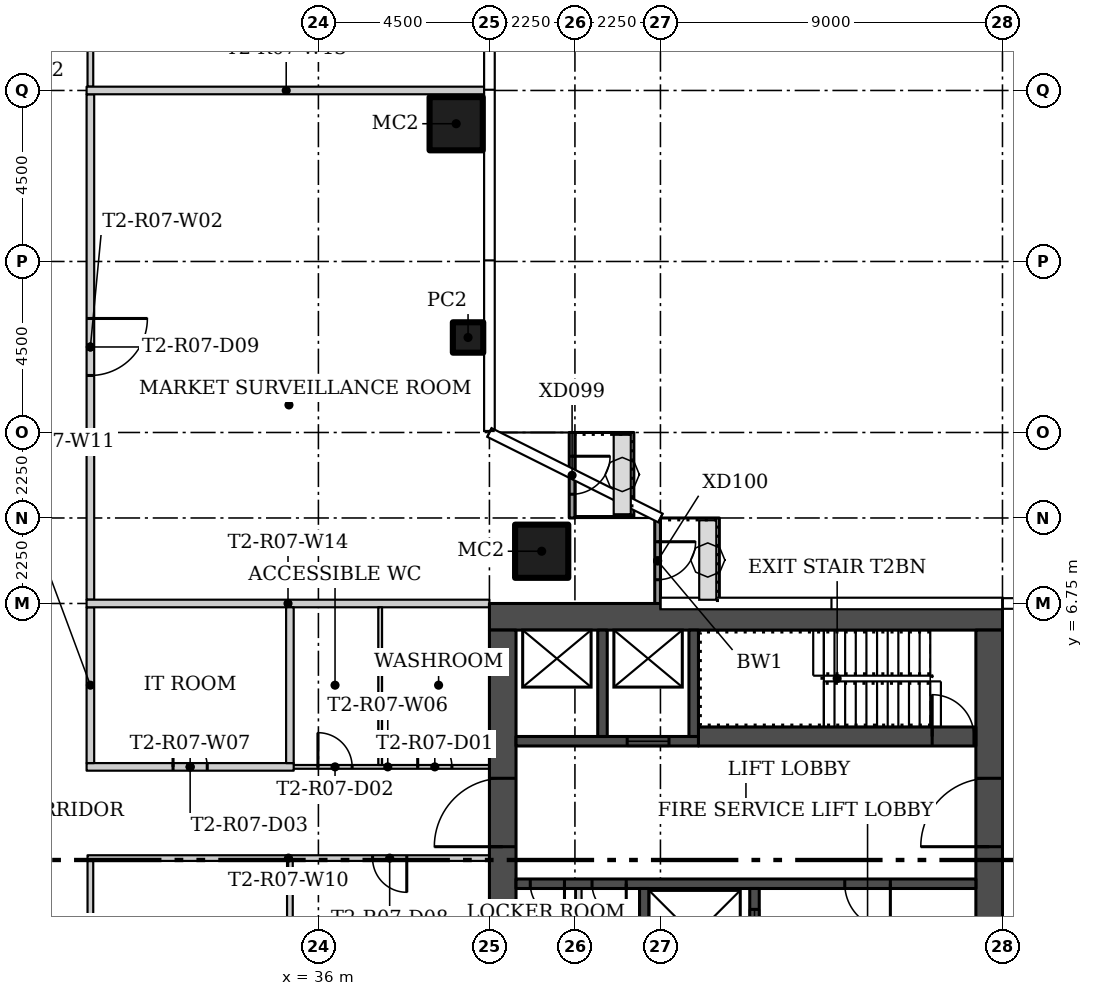
"""IFC4 building model, lengths in metres.
Left out: names, types, materials, properties, quantities, classifications, styles, units other than length and angle.
Written with IfcOpenShell. Run it as: python <this file> out.ifc"""

import sys

from ifc_helpers import new_model, si_unit, direction, frame, frame_2d, origin, origin_2d, place, context, subcontext, project, spatial, rectangle, hollow_rectangle, extrude, element, fill, save


model = new_model("IFC4")
c1 = context("Model", 3, precision=1e-05, world=origin(), true_north=direction((0.0, 1.0)))
c2 = subcontext(c1, "Body", "Model", "MODEL_VIEW")
j1 = project(units=[si_unit("LENGTHUNIT", "METRE"), si_unit("PLANEANGLEUNIT", "RADIAN")], contexts=[c1])
p1 = place(None, origin())
s1 = spatial("IfcSite", under=j1, at=p1, CompositionType="ELEMENT")
p2 = place(p1, origin())
s2 = spatial("IfcBuilding", under=s1, at=p2, CompositionType="ELEMENT")
p3 = place(p2, frame((0.0, 0.0, 73.2)))
s3 = spatial("IfcBuildingStorey", under=s2, at=p3, CompositionType="ELEMENT", Elevation=73.2)
p4 = place(p3, frame((41.875, 8.125, 0.0)))
e1 = element("IfcColumn", 1, at=p4, inside=s3, PredefinedType="COLUMN", context=c2, shape_type="SweptSolid", body=[
    extrude(hollow_rectangle(XDim=1.4, YDim=1.4, WallThickness=0.05, at=origin_2d()), origin(), (0.0, 0.0, 1.0), 3.45),
])
p5 = place(p3, frame((39.938, 13.75, 0.0)))
e2 = element("IfcColumn", 2, at=p5, inside=s3, PredefinedType="COLUMN", context=c2, shape_type="SweptSolid", body=[
    extrude(hollow_rectangle(XDim=0.8, YDim=0.8, WallThickness=0.025, at=origin_2d()), origin(), (0.0, 0.0, 1.0), 3.45),
])
p6 = place(p3, frame((39.625, 19.375, 0.0)))
e3 = element("IfcColumn", 3, at=p6, inside=s3, PredefinedType="COLUMN", context=c2, shape_type="SweptSolid", body=[
    extrude(hollow_rectangle(XDim=1.4, YDim=1.4, WallThickness=0.05, at=origin_2d()), origin(), (0.0, 0.0, 1.0), 3.45),
])
p7 = place(p3, frame((30.0, 20.15, 0.0), z_axis=(0.0, 0.0, 1.0), x_axis=(0.0, -1.0, 0.0)))
e4 = element("IfcWall", 4, at=p7, inside=s3, PredefinedType="PARTITIONING", context=c2, shape_type="SweptSolid", body=[
    extrude(rectangle(XDim=13.3, YDim=0.2, at=frame_2d((6.65, 0.0))), origin(), (0.0, 0.0, 1.0), 3.45),
])
p8 = place(p7, frame((5.9, 0.0, 0.0)))
e5 = element("IfcOpeningElement", 5, at=p8, cuts=e4, PredefinedType="OPENING", context=c2, shape_type="SweptSolid", body=[
    extrude(rectangle(XDim=1.5, YDim=2.1, at=frame_2d((0.75, 1.05))), frame((0.0, 0.11, 0.0), z_axis=(0.0, -1.0, 0.0), x_axis=(1.0, 0.0, 0.0)), (0.0, 0.0, 1.0), 0.22),
])
p9 = place(p3, frame((30.0, -0.025, 0.0), z_axis=(0.0, 0.0, 1.0), x_axis=(0.0, -1.0, 0.0)))
e6 = element("IfcWall", 6, at=p9, inside=s3, PredefinedType="PARTITIONING", context=c2, shape_type="SweptSolid", body=[
    extrude(rectangle(XDim=6.65, YDim=0.15, at=frame_2d((3.325, 0.0))), origin(), (0.0, 0.0, 1.0), 3.45),
])
p10 = place(p9, frame((2.875, 0.0, 0.0)))
e7 = element("IfcOpeningElement", 7, at=p10, cuts=e6, PredefinedType="OPENING", context=c2, shape_type="SweptSolid", body=[
    extrude(rectangle(XDim=0.9, YDim=2.1, at=frame_2d((0.45, 1.05))), frame((0.0, 0.085, 0.0), z_axis=(0.0, -1.0, 0.0), x_axis=(1.0, 0.0, 0.0)), (0.0, 0.0, 1.0), 0.17),
])
p11 = place(p3, frame((30.0, 29.155, 0.0), z_axis=(0.0, 0.0, 1.0), x_axis=(0.0, -1.0, 0.0)))
e8 = element("IfcWall", 8, at=p11, inside=s3, PredefinedType="PARTITIONING", context=c2, shape_type="SweptSolid", body=[
    extrude(rectangle(XDim=8.805, YDim=0.15, at=frame_2d((4.402, 0.0))), origin(), (0.0, 0.0, 1.0), 3.45),
])
p12 = place(p11, frame((3.905, 0.0, 0.0)))
e9 = element("IfcOpeningElement", 9, at=p12, cuts=e8, PredefinedType="OPENING", context=c2, shape_type="SweptSolid", body=[
    extrude(rectangle(XDim=1.0, YDim=2.4, at=frame_2d((0.5, 1.2))), frame((0.0, 0.085, 0.0), z_axis=(0.0, -1.0, 0.0), x_axis=(1.0, 0.0, 0.0)), (0.0, 0.0, 1.0), 0.17),
])
p13 = place(p3, frame((35.15, 2.45, 0.0)))
e10 = element("IfcWall", 10, at=p13, inside=s3, PredefinedType="PARTITIONING", context=c2, shape_type="SweptSolid", body=[
    extrude(rectangle(XDim=5.35, YDim=0.1, at=frame_2d((2.675, 0.0))), origin(), (0.0, 0.0, 1.0), 3.45),
])
p14 = place(p13, frame((3.462, 0.0, 0.0)))
e11 = element("IfcOpeningElement", 11, at=p14, cuts=e10, PredefinedType="OPENING", context=c2, shape_type="SweptSolid", body=[
    extrude(rectangle(XDim=0.9, YDim=2.1, at=frame_2d((0.45, 1.05))), frame((0.0, 0.06, 0.0), z_axis=(0.0, -1.0, 0.0), x_axis=(1.0, 0.0, 0.0)), (0.0, 0.0, 1.0), 0.12),
])
p15 = place(p13, frame((0.837, 0.0, 0.0)))
e12 = element("IfcOpeningElement", 12, at=p15, cuts=e10, PredefinedType="OPENING", context=c2, shape_type="SweptSolid", body=[
    extrude(rectangle(XDim=0.9, YDim=2.1, at=frame_2d((0.45, 1.05))), frame((0.0, 0.06, 0.0), z_axis=(0.0, -1.0, 0.0), x_axis=(1.0, 0.0, 0.0)), (0.0, 0.0, 1.0), 0.12),
])
p16 = place(p3, frame((29.9, 2.45, 0.0)))
e13 = element("IfcWall", 13, at=p16, inside=s3, PredefinedType="PARTITIONING", context=c2, shape_type="SweptSolid", body=[
    extrude(rectangle(XDim=5.45, YDim=0.2, at=frame_2d((2.725, 0.0))), origin(), (0.0, 0.0, 1.0), 3.45),
])
p17 = place(p16, frame((2.275, 0.0, 0.0)))
e14 = element("IfcOpeningElement", 14, at=p17, cuts=e13, PredefinedType="OPENING", context=c2, shape_type="SweptSolid", body=[
    extrude(rectangle(XDim=0.9, YDim=2.1, at=frame_2d((0.45, 1.05))), frame((0.0, 0.11, 0.0), z_axis=(0.0, -1.0, 0.0), x_axis=(1.0, 0.0, 0.0)), (0.0, 0.0, 1.0), 0.22),
])
p18 = place(p3, frame((30.0, 6.65, 0.0), z_axis=(0.0, 0.0, 1.0), x_axis=(0.0, -1.0, 0.0)))
e15 = element("IfcWall", 15, at=p18, inside=s3, PredefinedType="PARTITIONING", context=c2, shape_type="SweptSolid", body=[
    extrude(rectangle(XDim=4.1, YDim=0.2, at=frame_2d((2.05, 0.0))), origin(), (0.0, 0.0, 1.0), 3.45),
])
p19 = place(p3, frame((40.5, 0.05, 0.0), z_axis=(0.0, 0.0, 1.0), x_axis=(-1.0, 0.0, 0.0)))
e16 = element("IfcWall", 16, at=p19, inside=s3, PredefinedType="PARTITIONING", context=c2, shape_type="SweptSolid", body=[
    extrude(rectangle(XDim=10.575, YDim=0.15, at=frame_2d((5.288, 0.0))), origin(), (0.0, 0.0, 1.0), 3.45),
])
p20 = place(p19, frame((2.175, 0.0, 0.0)))
e17 = element("IfcOpeningElement", 17, at=p20, cuts=e16, PredefinedType="OPENING", context=c2, shape_type="SweptSolid", body=[
    extrude(rectangle(XDim=0.9, YDim=2.1, at=frame_2d((0.45, 1.05))), frame((0.0, 0.085, 0.0), z_axis=(0.0, -1.0, 0.0), x_axis=(1.0, 0.0, 0.0)), (0.0, 0.0, 1.0), 0.17),
])
p21 = place(p3, frame((40.405, 20.25, 0.0), z_axis=(0.0, 0.0, 1.0), x_axis=(-1.0, 0.0, 0.0)))
e18 = element("IfcWall", 18, at=p21, inside=s3, PredefinedType="PARTITIONING", context=c2, shape_type="SweptSolid", body=[
    extrude(rectangle(XDim=10.505, YDim=0.2, at=frame_2d((5.252, 0.0))), origin(), (0.0, 0.0, 1.0), 3.45),
])
p22 = place(p3, frame((29.9, 6.75, 0.0)))
e19 = element("IfcWall", 19, at=p22, inside=s3, PredefinedType="PARTITIONING", context=c2, shape_type="SweptSolid", body=[
    extrude(rectangle(XDim=10.6, YDim=0.2, at=frame_2d((5.3, 0.0))), origin(), (0.0, 0.0, 1.0), 3.45),
])
p23 = place(p3, frame((37.625, 6.65, 0.0), z_axis=(0.0, 0.0, 1.0), x_axis=(0.0, -1.0, 0.0)))
e20 = element("IfcWall", 20, at=p23, inside=s3, PredefinedType="PARTITIONING", context=c2, shape_type="SweptSolid", body=[
    extrude(rectangle(XDim=4.15, YDim=0.1, at=frame_2d((2.075, 0.0))), origin(), (0.0, 0.0, 1.0), 3.45),
])
p24 = place(p3, frame((35.25, 6.65, 0.0), z_axis=(0.0, 0.0, 1.0), x_axis=(0.0, -1.0, 0.0)))
e21 = element("IfcWall", 21, at=p24, inside=s3, PredefinedType="PARTITIONING", context=c2, shape_type="SweptSolid", body=[
    extrude(rectangle(XDim=4.1, YDim=0.2, at=frame_2d((2.05, 0.0))), origin(), (0.0, 0.0, 1.0), 3.45),
])
p25 = place(p3, frame((35.25, -0.025, 0.0), z_axis=(0.0, 0.0, 1.0), x_axis=(0.0, -1.0, 0.0)))
e22 = element("IfcWall", 22, at=p25, inside=s3, PredefinedType="PARTITIONING", context=c2, shape_type="SweptSolid", body=[
    extrude(rectangle(XDim=6.65, YDim=0.15, at=frame_2d((3.325, 0.0))), origin(), (0.0, 0.0, 1.0), 3.45),
])
p26 = place(p3, frame((42.675, 11.25, 0.0), z_axis=(0.0, 0.0, 1.0), x_axis=(0.0, -1.0, 0.0)))
e23 = element("IfcWall", 23, at=p26, inside=s3, PredefinedType="SOLIDWALL", context=c2, shape_type="SweptSolid", body=[
    extrude(rectangle(XDim=2.25, YDim=0.15, at=frame_2d((1.125, 0.0))), origin(), (0.0, 0.0, 1.0), 3.45),
])
p27 = place(p26, frame((0.625, 0.0, 0.0)))
e24 = element("IfcOpeningElement", 24, at=p27, cuts=e23, PredefinedType="OPENING", context=c2, shape_type="SweptSolid", body=[
    extrude(rectangle(XDim=1.0, YDim=2.4, at=frame_2d((0.5, 1.2))), frame((0.0, 0.085, 0.0), z_axis=(0.0, -1.0, 0.0), x_axis=(1.0, 0.0, 0.0)), (0.0, 0.0, 1.0), 0.17),
])
p28 = place(p3, frame((44.925, 9.0, 0.0), z_axis=(0.0, 0.0, 1.0), x_axis=(0.0, -1.0, 0.0)))
e25 = element("IfcWall", 25, at=p28, inside=s3, PredefinedType="SOLIDWALL", context=c2, shape_type="SweptSolid", body=[
    extrude(rectangle(XDim=2.257, YDim=0.15, at=frame_2d((1.128, 0.0))), origin(), (0.0, 0.0, 1.0), 3.45),
])
p29 = place(p28, frame((0.625, 0.0, 0.0)))
e26 = element("IfcOpeningElement", 26, at=p29, cuts=e25, PredefinedType="OPENING", context=c2, shape_type="SweptSolid", body=[
    extrude(rectangle(XDim=1.0, YDim=2.4, at=frame_2d((0.5, 1.2))), frame((0.0, 0.085, 0.0), z_axis=(0.0, -1.0, 0.0), x_axis=(1.0, 0.0, 0.0)), (0.0, 0.0, 1.0), 0.17),
])
p30 = place(p3, frame((54.0, 6.4, 0.0), z_axis=(0.0, 0.0, 1.0), x_axis=(-1.0, 0.0, 0.0)))
e27 = element("IfcWall", 27, at=p30, inside=s3, PredefinedType="SHEAR", context=c2, shape_type="SweptSolid", body=[
    extrude(rectangle(XDim=13.5, YDim=0.7, at=frame_2d((6.75, 0.0))), origin(), (0.0, 0.0, 1.0), 3.45),
])
p31 = place(p3, frame((53.65, -6.05, 0.0), z_axis=(0.0, 0.0, 1.0), x_axis=(0.0, 1.0, 0.0)))
e28 = element("IfcWall", 28, at=p31, inside=s3, PredefinedType="SHEAR", context=c2, shape_type="SweptSolid", body=[
    extrude(rectangle(XDim=12.1, YDim=0.7, at=frame_2d((6.05, 0.0))), origin(), (0.0, 0.0, 1.0), 3.45),
])
p32 = place(p31, frame((6.4, 0.0, 0.0)))
e29 = element("IfcOpeningElement", 29, at=p32, cuts=e28, PredefinedType="OPENING", context=c2, shape_type="SweptSolid", body=[
    extrude(rectangle(XDim=1.8, YDim=2.4, at=frame_2d((0.9, 1.2))), frame((0.0, 0.36, 0.0), z_axis=(0.0, -1.0, 0.0), x_axis=(1.0, 0.0, 0.0)), (0.0, 0.0, 1.0), 0.72),
])
p33 = place(p3, frame((40.85, -6.05, 0.0), z_axis=(0.0, 0.0, 1.0), x_axis=(0.0, 1.0, 0.0)))
e30 = element("IfcWall", 30, at=p33, inside=s3, PredefinedType="SHEAR", context=c2, shape_type="SweptSolid", body=[
    extrude(rectangle(XDim=12.1, YDim=0.7, at=frame_2d((6.05, 0.0))), origin(), (0.0, 0.0, 1.0), 3.45),
])
p34 = place(p33, frame((0.8, 0.0, 0.0)))
e31 = element("IfcOpeningElement", 31, at=p34, cuts=e30, PredefinedType="OPENING", context=c2, shape_type="SweptSolid", body=[
    extrude(rectangle(XDim=1.2, YDim=2.1, at=frame_2d((0.6, 1.05))), frame((0.0, 0.36, 0.0), z_axis=(0.0, -1.0, 0.0), x_axis=(1.0, 0.0, 0.0)), (0.0, 0.0, 1.0), 0.72),
])
p35 = place(p33, frame((6.4, 0.0, 0.0)))
e32 = element("IfcOpeningElement", 32, at=p35, cuts=e30, PredefinedType="OPENING", context=c2, shape_type="SweptSolid", body=[
    extrude(rectangle(XDim=1.8, YDim=2.4, at=frame_2d((0.9, 1.2))), frame((0.0, 0.36, 0.0), z_axis=(0.0, -1.0, 0.0), x_axis=(1.0, 0.0, 0.0)), (0.0, 0.0, 1.0), 0.72),
])
p36 = place(p3, frame((53.3, -0.625, 0.0), z_axis=(0.0, 0.0, 1.0), x_axis=(-1.0, 0.0, 0.0)))
e33 = element("IfcWall", 33, at=p36, inside=s3, PredefinedType="SHEAR", context=c2, shape_type="SweptSolid", body=[
    extrude(rectangle(XDim=12.1, YDim=0.25, at=frame_2d((6.05, 0.0))), origin(), (0.0, 0.0, 1.0), 3.45),
])
p37 = place(p36, frame((2.25, 0.0, 0.0)))
e34 = element("IfcOpeningElement", 34, at=p37, cuts=e33, PredefinedType="OPENING", context=c2, shape_type="SweptSolid", body=[
    extrude(rectangle(XDim=1.2, YDim=2.1, at=frame_2d((0.6, 1.05))), frame((0.0, 0.135, 0.0), z_axis=(0.0, -1.0, 0.0), x_axis=(1.0, 0.0, 0.0)), (0.0, 0.0, 1.0), 0.27),
])
p38 = place(p36, frame((9.2, 0.0, 0.0)))
e35 = element("IfcOpeningElement", 35, at=p38, cuts=e33, PredefinedType="OPENING", context=c2, shape_type="SweptSolid", body=[
    extrude(rectangle(XDim=0.9, YDim=2.1, at=frame_2d((0.45, 1.05))), frame((0.0, 0.135, 0.0), z_axis=(0.0, -1.0, 0.0), x_axis=(1.0, 0.0, 0.0)), (0.0, 0.0, 1.0), 0.27),
])
p39 = place(p36, frame((10.825, 0.0, 0.0)))
e36 = element("IfcOpeningElement", 36, at=p39, cuts=e33, PredefinedType="OPENING", context=c2, shape_type="SweptSolid", body=[
    extrude(rectangle(XDim=0.9, YDim=2.1, at=frame_2d((0.45, 1.05))), frame((0.0, 0.135, 0.0), z_axis=(0.0, -1.0, 0.0), x_axis=(1.0, 0.0, 0.0)), (0.0, 0.0, 1.0), 0.27),
])
p40 = place(p3, frame((47.475, -3.25, 0.0), z_axis=(0.0, 0.0, 1.0), x_axis=(0.0, 1.0, 0.0)))
e37 = element("IfcWall", 37, at=p40, inside=s3, PredefinedType="SHEAR", context=c2, shape_type="SweptSolid", body=[
    extrude(rectangle(XDim=2.5, YDim=0.25, at=frame_2d((1.25, 0.0))), origin(), (0.0, 0.0, 1.0), 3.45),
])
p41 = place(p40, frame((0.55, 0.0, 0.0)))
e38 = element("IfcOpeningElement", 38, at=p41, cuts=e37, PredefinedType="OPENING", context=c2, shape_type="SweptSolid", body=[
    extrude(rectangle(XDim=1.4, YDim=2.4, at=frame_2d((0.7, 1.2))), frame((0.0, 0.135, 0.0), z_axis=(0.0, -1.0, 0.0), x_axis=(1.0, 0.0, 0.0)), (0.0, 0.0, 1.0), 0.27),
])
p42 = place(p3, frame((44.575, -3.25, 0.0), z_axis=(0.0, 0.0, 1.0), x_axis=(0.0, 1.0, 0.0)))
e39 = element("IfcWall", 39, at=p42, inside=s3, PredefinedType="SHEAR", context=c2, shape_type="SweptSolid", body=[
    extrude(rectangle(XDim=2.5, YDim=0.25, at=frame_2d((1.25, 0.0))), origin(), (0.0, 0.0, 1.0), 3.45),
])
p43 = place(p3, frame((42.85, -3.25, 0.0), z_axis=(0.0, 0.0, 1.0), x_axis=(0.0, 1.0, 0.0)))
e40 = element("IfcWall", 40, at=p43, inside=s3, PredefinedType="PARTITIONING", context=c2, shape_type="SweptSolid", body=[
    extrude(rectangle(XDim=2.5, YDim=0.15, at=frame_2d((1.25, 0.0))), origin(), (0.0, 0.0, 1.0), 3.45),
])
p44 = place(p3, frame((46.0, 3.25, 0.0)))
e41 = element("IfcWall", 41, at=p44, inside=s3, PredefinedType="SHEAR", context=c2, shape_type="SweptSolid", body=[
    extrude(rectangle(XDim=7.3, YDim=0.5, at=frame_2d((3.65, 0.0))), origin(), (0.0, 0.0, 1.0), 3.45),
])
p45 = place(p44, frame((6.15, 0.0, 0.0)))
e42 = element("IfcOpeningElement", 42, at=p45, cuts=e41, PredefinedType="OPENING", context=c2, shape_type="SweptSolid", body=[
    extrude(rectangle(XDim=1.1, YDim=2.1, at=frame_2d((0.55, 1.05))), frame((0.0, 0.26, 0.0), z_axis=(0.0, -1.0, 0.0), x_axis=(1.0, 0.0, 0.0)), (0.0, 0.0, 1.0), 0.52),
])
p46 = place(p3, frame((46.0, 3.125, 0.0), z_axis=(0.0, 0.0, 1.0), x_axis=(-1.0, 0.0, 0.0)))
e43 = element("IfcWall", 43, at=p46, inside=s3, PredefinedType="SHEAR", context=c2, shape_type="SweptSolid", body=[
    extrude(rectangle(XDim=4.8, YDim=0.25, at=frame_2d((2.4, 0.0))), origin(), (0.0, 0.0, 1.0), 3.45),
])
p47 = place(p46, frame((0.775, 0.0, 0.0)))
e44 = element("IfcOpeningElement", 44, at=p47, cuts=e43, PredefinedType="OPENING", context=c2, shape_type="SweptSolid", body=[
    extrude(rectangle(XDim=1.1, YDim=2.1, at=frame_2d((0.55, 1.05))), frame((0.0, 0.135, 0.0), z_axis=(0.0, -1.0, 0.0), x_axis=(1.0, 0.0, 0.0)), (0.0, 0.0, 1.0), 0.27),
])
for number, where, z_axis, x_axis in (
    (45, (45.875, 3.25, 0.0), (0.0, 0.0, 1.0), (0.0, 1.0, 0.0)),
    (46, (43.475, 3.25, 0.0), (0.0, 0.0, 1.0), (0.0, 1.0, 0.0)),
):
    element("IfcWall", number, at=place(p3, frame(where, z_axis=z_axis, x_axis=x_axis)), inside=s3, PredefinedType="SHEAR", context=c2, shape_type="SweptSolid", body=[
        extrude(rectangle(XDim=2.8, YDim=0.25, at=frame_2d((1.4, 0.0))), origin(), (0.0, 0.0, 1.0), 3.45),
    ])
p48 = place(p14, origin())
e47 = element("IfcDoor", 47, at=p48, inside=s3, OperationType="SINGLE_SWING_RIGHT", PredefinedType="DOOR", context=c2, shape_type="SweptSolid", body=[
    extrude(rectangle(XDim=0.9, YDim=2.1, at=frame_2d((0.45, 1.05))), frame((0.0, 0.025, 0.0), z_axis=(0.0, -1.0, 0.0), x_axis=(1.0, 0.0, 0.0)), (0.0, 0.0, 1.0), 0.05),
])
fill(e11, e47)
p49 = place(p15, origin())
e48 = element("IfcDoor", 48, at=p49, inside=s3, OperationType="SINGLE_SWING_LEFT", PredefinedType="DOOR", context=c2, shape_type="SweptSolid", body=[
    extrude(rectangle(XDim=0.9, YDim=2.1, at=frame_2d((0.45, 1.05))), frame((0.0, 0.025, 0.0), z_axis=(0.0, -1.0, 0.0), x_axis=(1.0, 0.0, 0.0)), (0.0, 0.0, 1.0), 0.05),
])
fill(e12, e48)
p50 = place(p17, origin())
e49 = element("IfcDoor", 49, at=p50, inside=s3, OperationType="SINGLE_SWING_LEFT", PredefinedType="DOOR", context=c2, shape_type="SweptSolid", body=[
    extrude(rectangle(XDim=0.9, YDim=2.1, at=frame_2d((0.45, 1.05))), frame((0.0, 0.025, 0.0), z_axis=(0.0, -1.0, 0.0), x_axis=(1.0, 0.0, 0.0)), (0.0, 0.0, 1.0), 0.05),
])
fill(e14, e49)
p51 = place(p20, origin())
e50 = element("IfcDoor", 50, at=p51, inside=s3, OperationType="SINGLE_SWING_RIGHT", PredefinedType="DOOR", context=c2, shape_type="SweptSolid", body=[
    extrude(rectangle(XDim=0.9, YDim=2.1, at=frame_2d((0.45, 1.05))), frame((0.0, 0.025, 0.0), z_axis=(0.0, -1.0, 0.0), x_axis=(1.0, 0.0, 0.0)), (0.0, 0.0, 1.0), 0.05),
])
fill(e17, e50)
p52 = place(p8, origin())
e51 = element("IfcDoor", 51, at=p52, inside=s3, OperationType="DOUBLE_DOOR_SINGLE_SWING", PredefinedType="DOOR", context=c2, shape_type="SweptSolid", body=[
    extrude(rectangle(XDim=1.5, YDim=2.1, at=frame_2d((0.75, 1.05))), frame((0.0, 0.025, 0.0), z_axis=(0.0, -1.0, 0.0), x_axis=(1.0, 0.0, 0.0)), (0.0, 0.0, 1.0), 0.05),
])
fill(e5, e51)
p53 = place(p27, origin())
e52 = element("IfcDoor", 52, at=p53, inside=s3, OperationType="SINGLE_SWING_RIGHT", PredefinedType="DOOR", context=c2, shape_type="SweptSolid", body=[
    extrude(rectangle(XDim=1.0, YDim=2.4, at=frame_2d((0.5, 1.2))), frame((0.0, 0.025, 0.0), z_axis=(0.0, -1.0, 0.0), x_axis=(1.0, 0.0, 0.0)), (0.0, 0.0, 1.0), 0.05),
])
fill(e24, e52)
p54 = place(p29, origin())
e53 = element("IfcDoor", 53, at=p54, inside=s3, OperationType="SINGLE_SWING_LEFT", PredefinedType="DOOR", context=c2, shape_type="SweptSolid", body=[
    extrude(rectangle(XDim=1.0, YDim=2.4, at=frame_2d((0.5, 1.2))), frame((0.0, 0.025, 0.0), z_axis=(0.0, -1.0, 0.0), x_axis=(1.0, 0.0, 0.0)), (0.0, 0.0, 1.0), 0.05),
])
fill(e26, e53)
p55 = place(p32, origin())
e54 = element("IfcDoor", 54, at=p55, inside=s3, OperationType="DOUBLE_DOOR_SINGLE_SWING", PredefinedType="DOOR", context=c2, shape_type="SweptSolid", body=[
    extrude(rectangle(XDim=1.8, YDim=2.4, at=frame_2d((0.9, 1.2))), frame((0.0, 0.025, 0.0), z_axis=(0.0, -1.0, 0.0), x_axis=(1.0, 0.0, 0.0)), (0.0, 0.0, 1.0), 0.05),
])
fill(e29, e54)
p56 = place(p35, origin())
e55 = element("IfcDoor", 55, at=p56, inside=s3, OperationType="DOUBLE_DOOR_SINGLE_SWING", PredefinedType="DOOR", context=c2, shape_type="SweptSolid", body=[
    extrude(rectangle(XDim=1.8, YDim=2.4, at=frame_2d((0.9, 1.2))), frame((0.0, 0.025, 0.0), z_axis=(0.0, -1.0, 0.0), x_axis=(1.0, 0.0, 0.0)), (0.0, 0.0, 1.0), 0.05),
])
fill(e32, e55)
p57 = place(p37, origin())
e56 = element("IfcDoor", 56, at=p57, inside=s3, OperationType="SINGLE_SWING_LEFT", PredefinedType="DOOR", context=c2, shape_type="SweptSolid", body=[
    extrude(rectangle(XDim=1.2, YDim=2.1, at=frame_2d((0.6, 1.05))), frame((0.0, 0.025, 0.0), z_axis=(0.0, -1.0, 0.0), x_axis=(1.0, 0.0, 0.0)), (0.0, 0.0, 1.0), 0.05),
])
fill(e34, e56)
p58 = place(p38, origin())
e57 = element("IfcDoor", 57, at=p58, inside=s3, OperationType="SINGLE_SWING_RIGHT", PredefinedType="DOOR", context=c2, shape_type="SweptSolid", body=[
    extrude(rectangle(XDim=0.9, YDim=2.1, at=frame_2d((0.45, 1.05))), frame((0.0, 0.025, 0.0), z_axis=(0.0, -1.0, 0.0), x_axis=(1.0, 0.0, 0.0)), (0.0, 0.0, 1.0), 0.05),
])
fill(e35, e57)
p59 = place(p39, origin())
e58 = element("IfcDoor", 58, at=p59, inside=s3, OperationType="SINGLE_SWING_RIGHT", PredefinedType="DOOR", context=c2, shape_type="SweptSolid", body=[
    extrude(rectangle(XDim=0.9, YDim=2.1, at=frame_2d((0.45, 1.05))), frame((0.0, 0.025, 0.0), z_axis=(0.0, -1.0, 0.0), x_axis=(1.0, 0.0, 0.0)), (0.0, 0.0, 1.0), 0.05),
])
fill(e36, e58)
p60 = place(p41, origin())
e59 = element("IfcDoor", 59, at=p60, inside=s3, OperationType="SLIDING_TO_LEFT", PredefinedType="DOOR", context=c2, shape_type="SweptSolid", body=[
    extrude(rectangle(XDim=1.4, YDim=2.4, at=frame_2d((0.7, 1.2))), frame((0.0, 0.025, 0.0), z_axis=(0.0, -1.0, 0.0), x_axis=(1.0, 0.0, 0.0)), (0.0, 0.0, 1.0), 0.05),
])
fill(e38, e59)
p61 = place(p45, origin())
e60 = element("IfcDoor", 60, at=p61, inside=s3, OperationType="SINGLE_SWING_RIGHT", PredefinedType="DOOR", context=c2, shape_type="SweptSolid", body=[
    extrude(rectangle(XDim=1.1, YDim=2.1, at=frame_2d((0.55, 1.05))), frame((0.0, 0.025, 0.0), z_axis=(0.0, -1.0, 0.0), x_axis=(1.0, 0.0, 0.0)), (0.0, 0.0, 1.0), 0.05),
])
fill(e42, e60)
p62 = place(p47, origin())
e61 = element("IfcDoor", 61, at=p62, inside=s3, OperationType="SLIDING_TO_LEFT", PredefinedType="DOOR", context=c2, shape_type="SweptSolid", body=[
    extrude(rectangle(XDim=1.1, YDim=2.1, at=frame_2d((0.55, 1.05))), frame((0.0, 0.025, 0.0), z_axis=(0.0, -1.0, 0.0), x_axis=(1.0, 0.0, 0.0)), (0.0, 0.0, 1.0), 0.05),
])
fill(e44, e61)
save(model, sys.argv[1])
